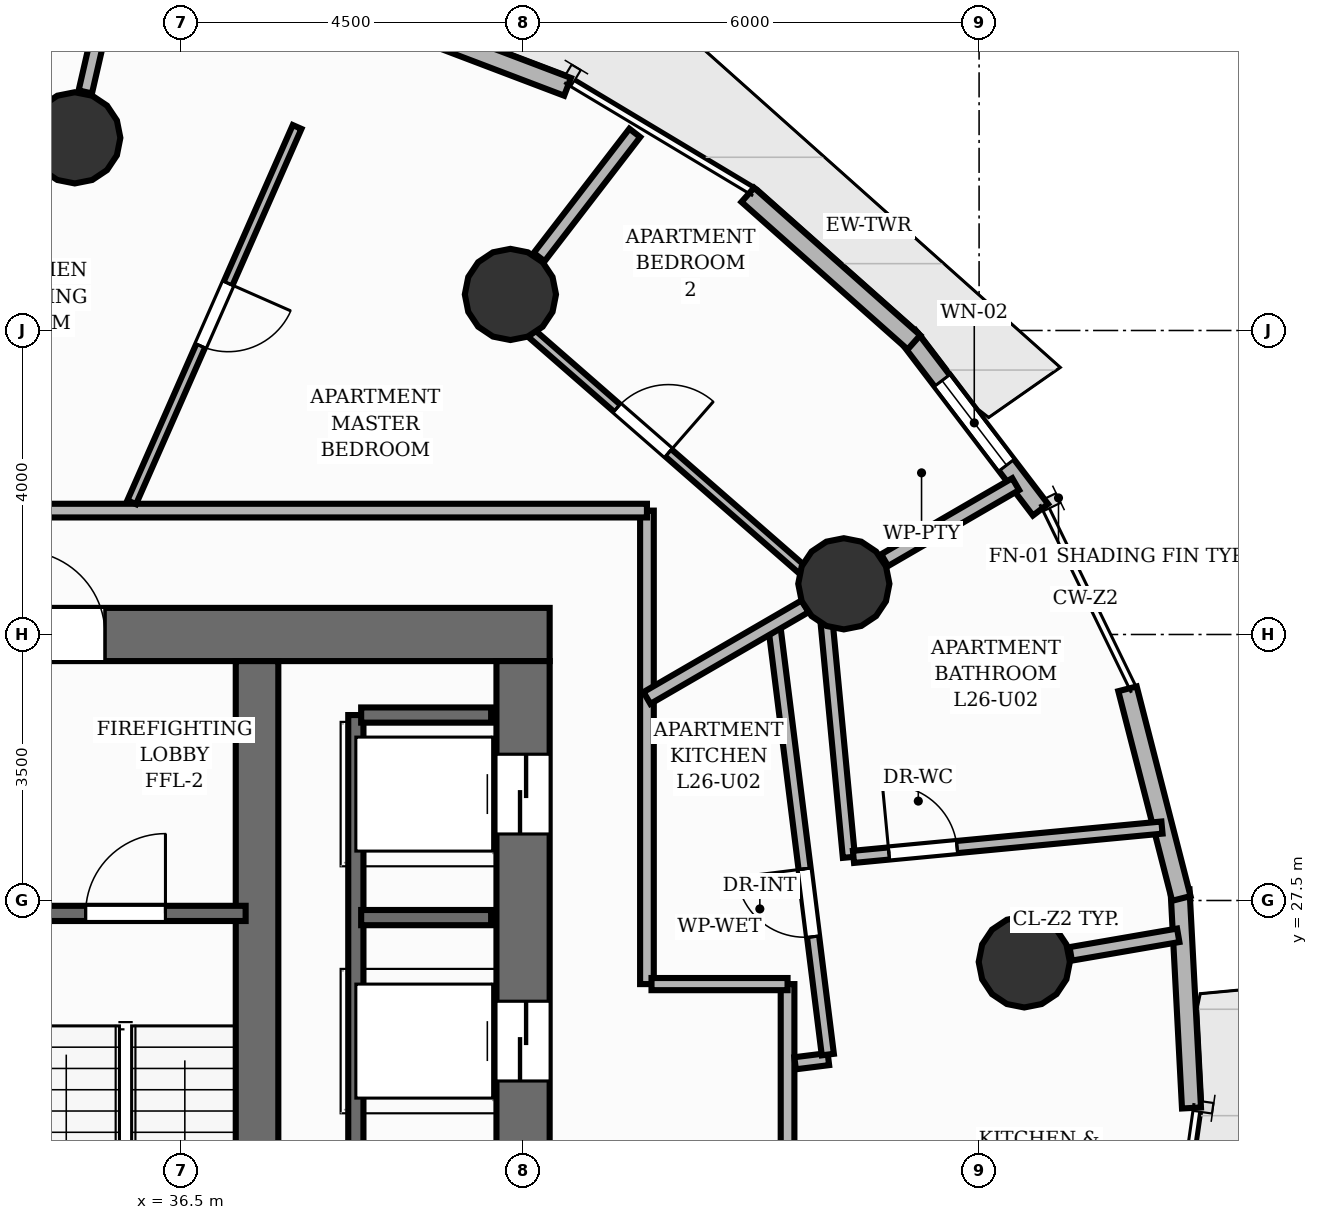
"""IFC4 building model, lengths in metres.
Left out: names, types, materials, properties, quantities, classifications, styles, units other than length and angle.
Written with IfcOpenShell. Run it as: python <this file> out.ifc"""

import sys

from ifc_helpers import new_model, si_unit, direction, frame, frame_2d, origin, origin_2d, place, context, subcontext, project, spatial, rectangle, circle, extrude, element, fill, save


model = new_model("IFC4")
c1 = context("Model", 3, precision=1e-05, world=origin(), true_north=direction((0.0, 1.0)))
c2 = subcontext(c1, "Body", "Model", "MODEL_VIEW")
j1 = project(units=[si_unit("LENGTHUNIT", "METRE"), si_unit("PLANEANGLEUNIT", "RADIAN")], contexts=[c1])
p1 = place(None, origin())
s1 = spatial("IfcSite", under=j1, at=p1, CompositionType="ELEMENT")
p2 = place(p1, origin())
s2 = spatial("IfcBuilding", under=s1, at=p2, CompositionType="ELEMENT")
p3 = place(p2, frame((0.0, 0.0, 90.08)))
s3 = spatial("IfcBuildingStorey", under=s2, at=p3, CompositionType="ELEMENT", Elevation=90.08)
p4 = place(p3, frame((22.65, 31.0, 0.0), z_axis=(0.0, 0.0, 1.0), x_axis=(1.0, 0.0, 0.0)))
e1 = element("IfcWall", 1, at=p4, inside=s3, PredefinedType="SHEAR", context=c2, shape_type="SweptSolid", body=[
    extrude(rectangle(XDim=18.7, YDim=0.7, at=frame_2d((9.35, 0.0))), origin(), (0.0, 0.0, 1.0), 3.2),
])
p5 = place(p4, frame((11.75, 0.0, 0.0)))
e2 = element("IfcOpeningElement", 2, at=p5, cuts=e1, PredefinedType="OPENING", context=c2, shape_type="SweptSolid", body=[
    extrude(rectangle(XDim=1.1, YDim=2.15, at=frame_2d((0.55, 1.075))), frame((0.0, 0.36, 0.0), z_axis=(0.0, -1.0, 0.0), x_axis=(1.0, 0.0, 0.0)), (0.0, 0.0, 1.0), 0.72),
])
p6 = place(p3, frame((41.0, 17.35, 0.0), z_axis=(0.0, 0.0, 1.0), x_axis=(0.0, 1.0, 0.0)))
e3 = element("IfcWall", 3, at=p6, inside=s3, PredefinedType="SHEAR", context=c2, shape_type="SweptSolid", body=[
    extrude(rectangle(XDim=13.3, YDim=0.7, at=frame_2d((6.65, 0.0))), origin(), (0.0, 0.0, 1.0), 3.2),
])
p7 = place(p6, frame((1.225, 0.0, 0.0)))
e4 = element("IfcOpeningElement", 4, at=p7, cuts=e3, PredefinedType="OPENING", context=c2, shape_type="SweptSolid", body=[
    extrude(rectangle(XDim=1.05, YDim=2.15, at=frame_2d((0.525, 1.075))), frame((0.0, 0.36, 0.0), z_axis=(0.0, -1.0, 0.0), x_axis=(1.0, 0.0, 0.0)), (0.0, 0.0, 1.0), 0.72),
])
p8 = place(p6, frame((4.475, 0.0, 0.0)))
e5 = element("IfcOpeningElement", 5, at=p8, cuts=e3, PredefinedType="OPENING", context=c2, shape_type="SweptSolid", body=[
    extrude(rectangle(XDim=1.05, YDim=2.15, at=frame_2d((0.525, 1.075))), frame((0.0, 0.36, 0.0), z_axis=(0.0, -1.0, 0.0), x_axis=(1.0, 0.0, 0.0)), (0.0, 0.0, 1.0), 0.72),
])
p9 = place(p6, frame((7.775, 0.0, 0.0)))
e6 = element("IfcOpeningElement", 6, at=p9, cuts=e3, PredefinedType="OPENING", context=c2, shape_type="SweptSolid", body=[
    extrude(rectangle(XDim=1.05, YDim=2.15, at=frame_2d((0.525, 1.075))), frame((0.0, 0.36, 0.0), z_axis=(0.0, -1.0, 0.0), x_axis=(1.0, 0.0, 0.0)), (0.0, 0.0, 1.0), 0.72),
])
p10 = place(p6, frame((11.025, 0.0, 0.0)))
e7 = element("IfcOpeningElement", 7, at=p10, cuts=e3, PredefinedType="OPENING", context=c2, shape_type="SweptSolid", body=[
    extrude(rectangle(XDim=1.05, YDim=2.15, at=frame_2d((0.525, 1.075))), frame((0.0, 0.36, 0.0), z_axis=(0.0, -1.0, 0.0), x_axis=(1.0, 0.0, 0.0)), (0.0, 0.0, 1.0), 0.72),
])
p11 = place(p3, frame((37.5, 17.35, 0.0), z_axis=(0.0, 0.0, 1.0), x_axis=(0.0, 1.0, 0.0)))
e8 = element("IfcWall", 8, at=p11, inside=s3, PredefinedType="SHEAR", context=c2, shape_type="SweptSolid", body=[
    extrude(rectangle(XDim=13.3, YDim=0.56, at=frame_2d((6.65, 0.0))), origin(), (0.0, 0.0, 1.0), 3.2),
])
for number, where, z_axis, x_axis in (
    (9, (47.594, 26.692, 0.0), (0.0, 0.0, 1.0), (1.0, 0.0, 0.0)),
    (10, (45.22, 31.667, 0.0), (0.0, 0.0, 1.0), (1.0, 0.0, 0.0)),
    (11, (40.833, 35.474, 0.0), (0.0, 0.0, 1.0), (1.0, 0.0, 0.0)),
    (12, (35.102, 37.535, 0.0), (0.0, 0.0, 1.0), (1.0, 0.0, 0.0)),
):
    element("IfcColumn", number, at=place(p3, frame(where, z_axis=z_axis, x_axis=x_axis)), inside=s3, PredefinedType="COLUMN", context=c2, shape_type="SweptSolid", body=[
        extrude(circle(Radius=0.6, at=origin_2d()), origin(), (0.0, 0.0, 1.0), 3.2),
    ])
p12 = place(p3, frame((46.065, 34.927, 0.0), z_axis=(0.0, 0.0, 1.0), x_axis=(0.606166055027, -0.795338112838, 0.0)))
e13 = element("IfcWall", 13, at=p12, inside=s3, PredefinedType="SOLIDWALL", context=c2, shape_type="SweptSolid", body=[
    extrude(rectangle(XDim=2.874, YDim=0.25, at=frame_2d((1.437, 0.0))), origin(), (0.0, 0.0, 1.0), 2.96),
])
p13 = place(p12, frame((0.737, 0.0, 0.85)))
e14 = element("IfcOpeningElement", 14, at=p13, cuts=e13, PredefinedType="OPENING", context=c2, shape_type="SweptSolid", body=[
    extrude(rectangle(XDim=1.4, YDim=1.37, at=frame_2d((0.7, 0.685))), frame((0.0, 0.135, 0.0), z_axis=(0.0, -1.0, 0.0), x_axis=(1.0, 0.0, 0.0)), (0.0, 0.0, 1.0), 0.27),
])
p14 = place(p3, frame((43.957, 36.784, 0.0), z_axis=(0.0, 0.0, 1.0), x_axis=(0.747828492436, -0.663891968547, 0.0)))
e15 = element("IfcWall", 15, at=p14, inside=s3, PredefinedType="SOLIDWALL", context=c2, shape_type="SweptSolid", body=[
    extrude(rectangle(XDim=2.923, YDim=0.25, at=frame_2d((1.461, 0.0))), origin(), (0.0, 0.0, 1.0), 2.96),
])
p15 = place(p3, frame((38.724, 39.293, 0.0), z_axis=(0.0, 0.0, 1.0), x_axis=(0.934815891493, -0.355132720277, 0.0)))
e16 = element("IfcWall", 16, at=p15, inside=s3, PredefinedType="SOLIDWALL", context=c2, shape_type="SweptSolid", body=[
    extrude(rectangle(XDim=3.061, YDim=0.25, at=frame_2d((1.53, 0.0))), origin(), (0.0, 0.0, 1.0), 2.96),
])
p16 = place(p3, frame((49.644, 27.64, 0.0), z_axis=(0.0, 0.0, 1.0), x_axis=(0.052411702269, -0.998625562193, 0.0)))
e17 = element("IfcWall", 17, at=p16, inside=s3, PredefinedType="SOLIDWALL", context=c2, shape_type="SweptSolid", body=[
    extrude(rectangle(XDim=2.874, YDim=0.25, at=frame_2d((1.437, 0.0))), origin(), (0.0, 0.0, 1.0), 2.96),
])
p17 = place(p3, frame((48.953, 30.285, 0.0), z_axis=(0.0, 0.0, 1.0), x_axis=(0.248825035787, -0.96854845081, 0.0)))
e18 = element("IfcWall", 18, at=p17, inside=s3, PredefinedType="SOLIDWALL", context=c2, shape_type="SweptSolid", body=[
    extrude(rectangle(XDim=2.847, YDim=0.25, at=frame_2d((1.424, 0.0))), origin(), (0.0, 0.0, 1.0), 2.96),
])
p18 = place(p3, frame((34.11, 27.33, 0.0), z_axis=(0.0, 0.0, 1.0), x_axis=(1.0, 0.0, 0.0)))
e19 = element("IfcWall", 19, at=p18, inside=s3, PredefinedType="SHEAR", context=c2, shape_type="SweptSolid", body=[
    extrude(rectangle(XDim=3.24, YDim=0.2, at=frame_2d((1.62, 0.0))), origin(), (0.0, 0.0, 1.0), 3.2),
])
p19 = place(p18, frame((1.135, 0.0, 0.0)))
e20 = element("IfcOpeningElement", 20, at=p19, cuts=e19, PredefinedType="OPENING", context=c2, shape_type="SweptSolid", body=[
    extrude(rectangle(XDim=1.05, YDim=2.15, at=frame_2d((0.525, 1.075))), frame((0.0, 0.11, 0.0), z_axis=(0.0, -1.0, 0.0), x_axis=(1.0, 0.0, 0.0)), (0.0, 0.0, 1.0), 0.22),
])
p20 = place(p3, frame((38.8, 18.06, 0.0), z_axis=(0.0, 0.0, 1.0), x_axis=(0.0, 1.0, 0.0)))
e21 = element("IfcWall", 21, at=p20, inside=s3, PredefinedType="SHEAR", context=c2, shape_type="SweptSolid", body=[
    extrude(rectangle(XDim=11.88, YDim=0.2, at=frame_2d((5.94, 0.0))), origin(), (0.0, 0.0, 1.0), 3.2),
])
for number, where, z_axis, x_axis in (
    (22, (38.87, 29.94, 0.0), (0.0, 0.0, 1.0), (1.0, 0.0, 0.0)),
    (23, (38.87, 27.275, 0.0), (0.0, 0.0, 1.0), (1.0, 0.0, 0.0)),
):
    element("IfcWall", number, at=place(p3, frame(where, z_axis=z_axis, x_axis=x_axis)), inside=s3, PredefinedType="SHEAR", context=c2, shape_type="SweptSolid", body=[
        extrude(rectangle(XDim=1.71, YDim=0.2, at=frame_2d((0.855, 0.0))), origin(), (0.0, 0.0, 1.0), 3.2),
    ])
p21 = place(p3, frame((48.206, 26.798, 0.0), z_axis=(0.0, 0.0, 1.0), x_axis=(0.985402123708, 0.170242928172, 0.0)))
e24 = element("IfcWall", 24, at=p21, inside=s3, PredefinedType="PARTITIONING", context=c2, shape_type="SweptSolid", body=[
    extrude(rectangle(XDim=1.436, YDim=0.18, at=frame_2d((0.718, 0.0))), origin(), (0.0, 0.0, 1.0), 2.26),
])
p22 = place(p3, frame((45.757, 31.978, 0.0), z_axis=(0.0, 0.0, 1.0), x_axis=(0.865046065875, 0.501692439563, 0.0)))
e25 = element("IfcWall", 25, at=p22, inside=s3, PredefinedType="PARTITIONING", context=c2, shape_type="SweptSolid", body=[
    extrude(rectangle(XDim=1.994, YDim=0.18, at=frame_2d((0.997, 0.0))), origin(), (0.0, 0.0, 1.0), 2.26),
])
p23 = place(p3, frame((41.212, 35.966, 0.0), z_axis=(0.0, 0.0, 1.0), x_axis=(0.609991040385, 0.792408310564, 0.0)))
e26 = element("IfcWall", 26, at=p23, inside=s3, PredefinedType="PARTITIONING", context=c2, shape_type="SweptSolid", body=[
    extrude(rectangle(XDim=2.062, YDim=0.18, at=frame_2d((1.031, 0.0))), origin(), (0.0, 0.0, 1.0), 2.26),
])
p24 = place(p3, frame((35.24, 38.139, 0.0), z_axis=(0.0, 0.0, 1.0), x_axis=(0.223359217097, 0.974736200281, 0.0)))
e27 = element("IfcWall", 27, at=p24, inside=s3, PredefinedType="PARTITIONING", context=c2, shape_type="SweptSolid", body=[
    extrude(rectangle(XDim=1.712, YDim=0.18, at=frame_2d((0.856, 0.0))), origin(), (0.0, 0.0, 1.0), 2.26),
])
p25 = place(p3, frame((44.48, 26.4, 0.0), z_axis=(0.0, 0.0, 1.0), x_axis=(0.0, -1.0, 0.0)))
e28 = element("IfcWall", 28, at=p25, inside=s3, PredefinedType="PARTITIONING", context=c2, shape_type="SweptSolid", body=[
    extrude(rectangle(XDim=4.8, YDim=0.18, at=frame_2d((2.4, 0.0))), origin(), (0.0, 0.0, 1.0), 2.955),
])
p26 = place(p25, frame((2.392, 0.0, 0.0)))
e29 = element("IfcOpeningElement", 29, at=p26, cuts=e28, PredefinedType="OPENING", context=c2, shape_type="SweptSolid", body=[
    extrude(rectangle(XDim=1.05, YDim=2.15, at=frame_2d((0.525, 1.075))), frame((0.0, 0.1, 0.0), z_axis=(0.0, -1.0, 0.0), x_axis=(1.0, 0.0, 0.0)), (0.0, 0.0, 1.0), 0.2),
])
p27 = place(p3, frame((42.63, 32.63, 0.0), z_axis=(0.0, 0.0, 1.0), x_axis=(0.0, -1.0, 0.0)))
e30 = element("IfcWall", 30, at=p27, inside=s3, PredefinedType="PARTITIONING", context=c2, shape_type="SweptSolid", body=[
    extrude(rectangle(XDim=6.23, YDim=0.18, at=frame_2d((3.115, 0.0))), origin(), (0.0, 0.0, 1.0), 2.955),
])
p28 = place(p3, frame((42.69, 26.4, 0.0), z_axis=(0.0, 0.0, 1.0), x_axis=(1.0, 0.0, 0.0)))
e31 = element("IfcWall", 31, at=p28, inside=s3, PredefinedType="PLUMBINGWALL", context=c2, shape_type="SweptSolid", body=[
    extrude(rectangle(XDim=1.79, YDim=0.16, at=frame_2d((0.895, 0.0))), origin(), (0.0, 0.0, 1.0), 2.26),
])
p29 = place(p3, frame((22.351, 32.63, 0.0), z_axis=(0.0, 0.0, 1.0), x_axis=(1.0, 0.0, 0.0)))
e32 = element("IfcWall", 32, at=p29, inside=s3, PredefinedType="PARTITIONING", context=c2, shape_type="SweptSolid", body=[
    extrude(rectangle(XDim=20.279, YDim=0.18, at=frame_2d((10.14, 0.0))), origin(), (0.0, 0.0, 1.0), 2.955),
])
p30 = place(p29, frame((11.378, 0.0, 0.0)))
e33 = element("IfcOpeningElement", 33, at=p30, cuts=e32, PredefinedType="OPENING", context=c2, shape_type="SweptSolid", body=[
    extrude(rectangle(XDim=1.05, YDim=2.15, at=frame_2d((0.525, 1.075))), frame((0.0, 0.1, 0.0), z_axis=(0.0, -1.0, 0.0), x_axis=(1.0, 0.0, 0.0)), (0.0, 0.0, 1.0), 0.2),
])
p31 = place(p3, frame((44.997, 31.13, 0.0), z_axis=(0.0, 0.0, 1.0), x_axis=(0.094558062352, -0.995519348302, 0.0)))
e34 = element("IfcWall", 34, at=p31, inside=s3, PredefinedType="PLUMBINGWALL", context=c2, shape_type="SweptSolid", body=[
    extrude(rectangle(XDim=3.075, YDim=0.16, at=frame_2d((1.538, 0.0))), origin(), (0.0, 0.0, 1.0), 2.955),
])
p32 = place(p3, frame((45.347, 28.074, 0.0), z_axis=(0.0, 0.0, 1.0), x_axis=(0.995525564748, 0.09449259195, 0.0)))
e35 = element("IfcWall", 35, at=p32, inside=s3, PredefinedType="PLUMBINGWALL", context=c2, shape_type="SweptSolid", body=[
    extrude(rectangle(XDim=4.077, YDim=0.16, at=frame_2d((2.039, 0.0))), origin(), (0.0, 0.0, 1.0), 2.641),
])
p33 = place(p32, frame((0.469, 0.0, 0.0)))
e36 = element("IfcOpeningElement", 36, at=p33, cuts=e35, PredefinedType="OPENING", context=c2, shape_type="SweptSolid", body=[
    extrude(rectangle(XDim=0.9, YDim=2.1, at=frame_2d((0.45, 1.05))), frame((0.0, 0.09, 0.0), z_axis=(0.0, -1.0, 0.0), x_axis=(1.0, 0.0, 0.0)), (0.0, 0.0, 1.0), 0.18),
])
p34 = place(p3, frame((44.579, 25.358, 0.0), z_axis=(0.0, 0.0, 1.0), x_axis=(0.992294886409, 0.123898581135, 0.0)))
e37 = element("IfcWall", 37, at=p34, inside=s3, PredefinedType="PLUMBINGWALL", context=c2, shape_type="SweptSolid", body=[
    extrude(rectangle(XDim=0.441, YDim=0.16, at=frame_2d((0.221, 0.0))), origin(), (0.0, 0.0, 1.0), 2.955),
])
p35 = place(p3, frame((45.01, 25.473, 0.0), z_axis=(0.0, 0.0, 1.0), x_axis=(-0.123955741663, 0.992287747636, 0.0)))
e38 = element("IfcWall", 38, at=p35, inside=s3, PredefinedType="PLUMBINGWALL", context=c2, shape_type="SweptSolid", body=[
    extrude(rectangle(XDim=5.706, YDim=0.16, at=frame_2d((2.853, 0.0))), origin(), (0.0, 0.0, 1.0), 2.955),
])
p36 = place(p35, frame((1.563, 0.0, 0.0)))
e39 = element("IfcOpeningElement", 39, at=p36, cuts=e38, PredefinedType="OPENING", context=c2, shape_type="SweptSolid", body=[
    extrude(rectangle(XDim=0.9, YDim=2.1, at=frame_2d((0.45, 1.05))), frame((0.0, 0.09, 0.0), z_axis=(0.0, -1.0, 0.0), x_axis=(1.0, 0.0, 0.0)), (0.0, 0.0, 1.0), 0.18),
])
p37 = place(p3, frame((42.63, 30.165, 0.0), z_axis=(0.0, 0.0, 1.0), x_axis=(0.86502326608, 0.501731750182, 0.0)))
e40 = element("IfcWall", 40, at=p37, inside=s3, PredefinedType="PARTITIONING", context=c2, shape_type="SweptSolid", body=[
    extrude(rectangle(XDim=2.407, YDim=0.18, at=frame_2d((1.204, 0.0))), origin(), (0.0, 0.0, 1.0), 2.26),
])
p38 = place(p3, frame((38.027, 37.678, 0.0), z_axis=(0.0, 0.0, 1.0), x_axis=(-0.403235845427, -0.91509608947, 0.0)))
e41 = element("IfcWall", 41, at=p38, inside=s3, PredefinedType="PARTITIONING", context=c2, shape_type="SweptSolid", body=[
    extrude(rectangle(XDim=5.396, YDim=0.125, at=frame_2d((2.698, 0.0))), origin(), (0.0, 0.0, 1.0), 2.955),
])
p39 = place(p38, frame((2.248, 0.0, 0.0)))
e42 = element("IfcOpeningElement", 42, at=p39, cuts=e41, PredefinedType="OPENING", context=c2, shape_type="SweptSolid", body=[
    extrude(rectangle(XDim=0.9, YDim=2.1, at=frame_2d((0.45, 1.05))), frame((0.0, 0.073, 0.0), z_axis=(0.0, -1.0, 0.0), x_axis=(1.0, 0.0, 0.0)), (0.0, 0.0, 1.0), 0.145),
])
p40 = place(p3, frame((41.112, 34.96, 0.0), z_axis=(0.0, 0.0, 1.0), x_axis=(0.753425123405, -0.657533712765, 0.0)))
e43 = element("IfcWall", 43, at=p40, inside=s3, PredefinedType="PARTITIONING", context=c2, shape_type="SweptSolid", body=[
    extrude(rectangle(XDim=4.72, YDim=0.125, at=frame_2d((2.36, 0.0))), origin(), (0.0, 0.0, 1.0), 2.403),
])
p41 = place(p40, frame((1.49, 0.0, 0.0)))
e44 = element("IfcOpeningElement", 44, at=p41, cuts=e43, PredefinedType="OPENING", context=c2, shape_type="SweptSolid", body=[
    extrude(rectangle(XDim=0.9, YDim=2.1, at=frame_2d((0.45, 1.05))), frame((0.0, 0.073, 0.0), z_axis=(0.0, -1.0, 0.0), x_axis=(1.0, 0.0, 0.0)), (0.0, 0.0, 1.0), 0.145),
])
p42 = place(p13, origin())
e45 = element("IfcWindow", 45, at=p42, inside=s3, PartitioningType="SINGLE_PANEL", PredefinedType="WINDOW", context=c2, shape_type="SweptSolid", body=[
    extrude(rectangle(XDim=1.4, YDim=1.37, at=frame_2d((0.7, 0.685))), frame((0.0, 0.03, 0.0), z_axis=(0.0, -1.0, 0.0), x_axis=(1.0, 0.0, 0.0)), (0.0, 0.0, 1.0), 0.06),
])
fill(e14, e45)
p43 = place(p19, origin())
e46 = element("IfcDoor", 46, at=p43, inside=s3, OperationType="SINGLE_SWING_RIGHT", PredefinedType="DOOR", context=c2, shape_type="SweptSolid", body=[
    extrude(rectangle(XDim=1.05, YDim=2.15, at=frame_2d((0.525, 1.075))), frame((0.0, 0.025, 0.0), z_axis=(0.0, -1.0, 0.0), x_axis=(1.0, 0.0, 0.0)), (0.0, 0.0, 1.0), 0.05),
])
fill(e20, e46)
p44 = place(p5, origin())
e47 = element("IfcDoor", 47, at=p44, inside=s3, OperationType="SINGLE_SWING_LEFT", PredefinedType="DOOR", context=c2, shape_type="SweptSolid", body=[
    extrude(rectangle(XDim=1.1, YDim=2.15, at=frame_2d((0.55, 1.075))), frame((0.0, 0.025, 0.0), z_axis=(0.0, -1.0, 0.0), x_axis=(1.0, 0.0, 0.0)), (0.0, 0.0, 1.0), 0.05),
])
fill(e2, e47)
p45 = place(p9, origin())
e48 = element("IfcDoor", 48, at=p45, inside=s3, OperationType="DOUBLE_DOOR_SLIDING", PredefinedType="DOOR", context=c2, shape_type="SweptSolid", body=[
    extrude(rectangle(XDim=1.05, YDim=2.15, at=frame_2d((0.525, 1.075))), frame((0.0, 0.025, 0.0), z_axis=(0.0, -1.0, 0.0), x_axis=(1.0, 0.0, 0.0)), (0.0, 0.0, 1.0), 0.05),
])
fill(e6, e48)
p46 = place(p10, origin())
e49 = element("IfcDoor", 49, at=p46, inside=s3, OperationType="DOUBLE_DOOR_SLIDING", PredefinedType="DOOR", context=c2, shape_type="SweptSolid", body=[
    extrude(rectangle(XDim=1.05, YDim=2.15, at=frame_2d((0.525, 1.075))), frame((0.0, 0.025, 0.0), z_axis=(0.0, -1.0, 0.0), x_axis=(1.0, 0.0, 0.0)), (0.0, 0.0, 1.0), 0.05),
])
fill(e7, e49)
p47 = place(p33, origin())
e50 = element("IfcDoor", 50, at=p47, inside=s3, OperationType="SINGLE_SWING_LEFT", PredefinedType="DOOR", context=c2, shape_type="SweptSolid", body=[
    extrude(rectangle(XDim=0.9, YDim=2.1, at=frame_2d((0.45, 1.05))), frame((0.0, 0.025, 0.0), z_axis=(0.0, -1.0, 0.0), x_axis=(1.0, 0.0, 0.0)), (0.0, 0.0, 1.0), 0.05),
])
fill(e36, e50)
p48 = place(p36, origin())
e51 = element("IfcDoor", 51, at=p48, inside=s3, OperationType="SINGLE_SWING_RIGHT", PredefinedType="DOOR", context=c2, shape_type="SweptSolid", body=[
    extrude(rectangle(XDim=0.9, YDim=2.1, at=frame_2d((0.45, 1.05))), frame((0.0, 0.025, 0.0), z_axis=(0.0, -1.0, 0.0), x_axis=(1.0, 0.0, 0.0)), (0.0, 0.0, 1.0), 0.05),
])
fill(e39, e51)
p49 = place(p39, origin())
e52 = element("IfcDoor", 52, at=p49, inside=s3, OperationType="SINGLE_SWING_LEFT", PredefinedType="DOOR", context=c2, shape_type="SweptSolid", body=[
    extrude(rectangle(XDim=0.9, YDim=2.1, at=frame_2d((0.45, 1.05))), frame((0.0, 0.025, 0.0), z_axis=(0.0, -1.0, 0.0), x_axis=(1.0, 0.0, 0.0)), (0.0, 0.0, 1.0), 0.05),
])
fill(e42, e52)
p50 = place(p41, origin())
e53 = element("IfcDoor", 53, at=p50, inside=s3, OperationType="SINGLE_SWING_RIGHT", PredefinedType="DOOR", context=c2, shape_type="SweptSolid", body=[
    extrude(rectangle(XDim=0.9, YDim=2.1, at=frame_2d((0.45, 1.05))), frame((0.0, 0.025, 0.0), z_axis=(0.0, -1.0, 0.0), x_axis=(1.0, 0.0, 0.0)), (0.0, 0.0, 1.0), 0.05),
])
fill(e44, e53)
save(model, sys.argv[1])
